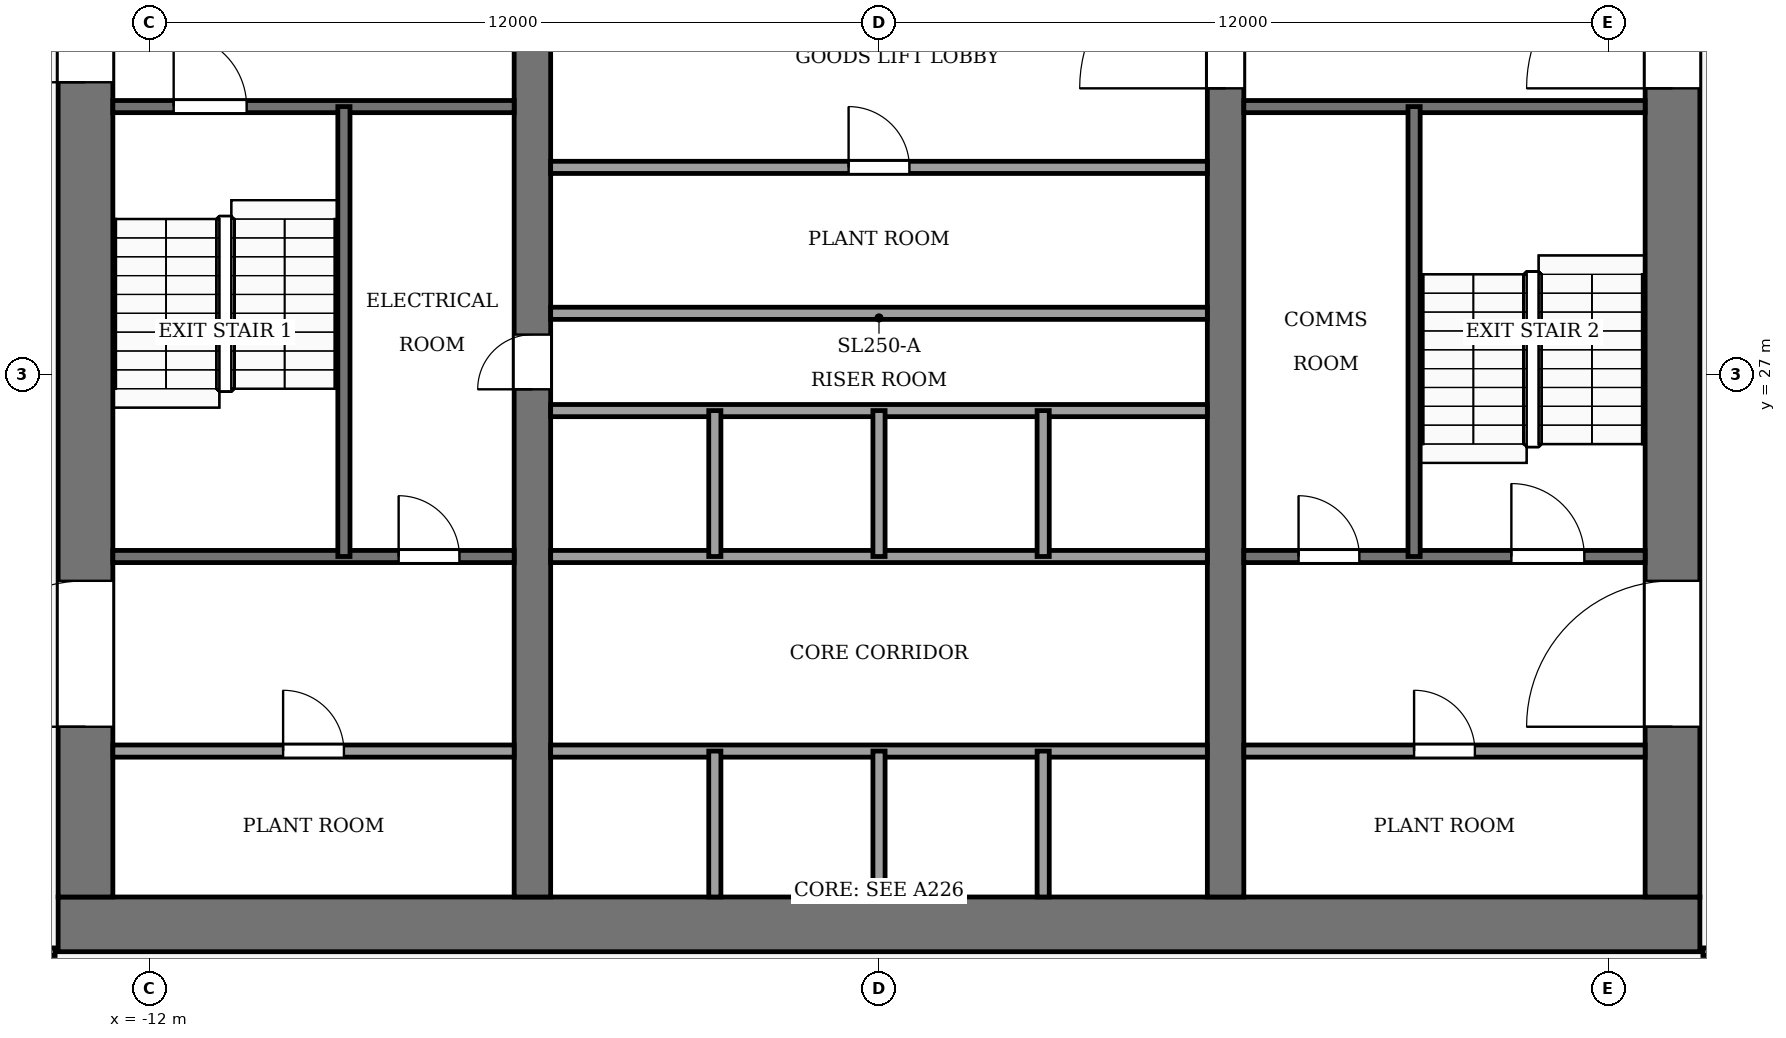
"""IFC4 building model, lengths in metres.
Left out: names, types, materials, properties, quantities, classifications, styles, units other than length and angle.
Written with IfcOpenShell. Run it as: python <this file> out.ifc"""

import sys

from ifc_helpers import new_model, si_unit, direction, frame, frame_2d, origin, place, context, subcontext, project, spatial, rectangle, extrude, element, fill, save


model = new_model("IFC4")
c1 = context("Model", 3, precision=1e-05, world=origin(), true_north=direction((0.0, 1.0)))
c2 = subcontext(c1, "Body", "Model", "MODEL_VIEW")
j1 = project(units=[si_unit("LENGTHUNIT", "METRE"), si_unit("PLANEANGLEUNIT", "RADIAN")], contexts=[c1])
p1 = place(None, origin())
s1 = spatial("IfcSite", under=j1, at=p1, CompositionType="ELEMENT")
p2 = place(p1, origin())
s2 = spatial("IfcBuilding", under=s1, at=p2, CompositionType="ELEMENT")
p3 = place(p2, frame((0.0, 0.0, 226.0)))
s3 = spatial("IfcBuildingStorey", under=s2, at=p3, CompositionType="ELEMENT", Elevation=226.0)
p4 = place(p3, frame((-13.5, 17.95, -0.25), z_axis=(0.0, 0.0, 1.0), x_axis=(1.0, 0.0, 0.0)))
e1 = element("IfcWall", 1, at=p4, inside=s3, PredefinedType="SHEAR", context=c2, shape_type="SweptSolid", body=[
    extrude(rectangle(XDim=27.0, YDim=0.9, at=frame_2d((13.5, 0.0))), origin(), (0.0, 0.0, 1.0), 7.12),
])
p5 = place(p3, frame((-13.05, 18.4, -0.25), z_axis=(0.0, 0.0, 1.0), x_axis=(0.0, 1.0, 0.0)))
e2 = element("IfcWall", 2, at=p5, inside=s3, PredefinedType="SHEAR", context=c2, shape_type="SweptSolid", body=[
    extrude(rectangle(XDim=19.2, YDim=0.9, at=frame_2d((9.6, 0.0))), origin(), (0.0, 0.0, 1.0), 7.12),
])
p6 = place(p5, frame((2.8, 0.0, 0.25)))
e3 = element("IfcOpeningElement", 3, at=p6, cuts=e2, PredefinedType="OPENING", context=c2, shape_type="SweptSolid", body=[
    extrude(rectangle(XDim=2.4, YDim=2.4, at=frame_2d((1.2, 1.2))), frame((0.0, 0.46, 0.0), z_axis=(0.0, -1.0, 0.0), x_axis=(1.0, 0.0, 0.0)), (0.0, 0.0, 1.0), 0.92),
])
p7 = place(p5, frame((13.4, 0.0, 0.25)))
e4 = element("IfcOpeningElement", 4, at=p7, cuts=e2, PredefinedType="OPENING", context=c2, shape_type="SweptSolid", body=[
    extrude(rectangle(XDim=1.4, YDim=2.2, at=frame_2d((0.7, 1.1))), frame((0.0, 0.46, 0.0), z_axis=(0.0, -1.0, 0.0), x_axis=(1.0, 0.0, 0.0)), (0.0, 0.0, 1.0), 0.92),
])
p8 = place(p3, frame((13.05, 18.4, -0.25), z_axis=(0.0, 0.0, 1.0), x_axis=(0.0, 1.0, 0.0)))
e5 = element("IfcWall", 5, at=p8, inside=s3, PredefinedType="SHEAR", context=c2, shape_type="SweptSolid", body=[
    extrude(rectangle(XDim=19.2, YDim=0.9, at=frame_2d((9.6, 0.0))), origin(), (0.0, 0.0, 1.0), 7.12),
])
p9 = place(p8, frame((2.8, 0.0, 0.25)))
e6 = element("IfcOpeningElement", 6, at=p9, cuts=e5, PredefinedType="OPENING", context=c2, shape_type="SweptSolid", body=[
    extrude(rectangle(XDim=2.4, YDim=2.4, at=frame_2d((1.2, 1.2))), frame((0.0, 0.46, 0.0), z_axis=(0.0, -1.0, 0.0), x_axis=(1.0, 0.0, 0.0)), (0.0, 0.0, 1.0), 0.92),
])
p10 = place(p8, frame((13.3, 0.0, 0.25)))
e7 = element("IfcOpeningElement", 7, at=p10, cuts=e5, PredefinedType="OPENING", context=c2, shape_type="SweptSolid", body=[
    extrude(rectangle(XDim=2.4, YDim=2.4, at=frame_2d((1.2, 1.2))), frame((0.0, 0.46, 0.0), z_axis=(0.0, -1.0, 0.0), x_axis=(1.0, 0.0, 0.0)), (0.0, 0.0, 1.0), 0.92),
])
p11 = place(p3, frame((-5.7, 18.4, -0.25), z_axis=(0.0, 0.0, 1.0), x_axis=(0.0, 1.0, 0.0)))
e8 = element("IfcWall", 8, at=p11, inside=s3, PredefinedType="SHEAR", context=c2, shape_type="SweptSolid", body=[
    extrude(rectangle(XDim=19.2, YDim=0.6, at=frame_2d((9.6, 0.0))), origin(), (0.0, 0.0, 1.0), 7.12),
])
p12 = place(p11, frame((8.35, 0.0, 0.25)))
e9 = element("IfcOpeningElement", 9, at=p12, cuts=e8, PredefinedType="OPENING", context=c2, shape_type="SweptSolid", body=[
    extrude(rectangle(XDim=0.9, YDim=2.1, at=frame_2d((0.45, 1.05))), frame((0.0, 0.31, 0.0), z_axis=(0.0, -1.0, 0.0), x_axis=(1.0, 0.0, 0.0)), (0.0, 0.0, 1.0), 0.62),
])
p13 = place(p3, frame((5.7, 18.4, -0.25), z_axis=(0.0, 0.0, 1.0), x_axis=(0.0, 1.0, 0.0)))
e10 = element("IfcWall", 10, at=p13, inside=s3, PredefinedType="SHEAR", context=c2, shape_type="SweptSolid", body=[
    extrude(rectangle(XDim=19.2, YDim=0.6, at=frame_2d((9.6, 0.0))), origin(), (0.0, 0.0, 1.0), 7.12),
])
p14 = place(p13, frame((13.3, 0.0, 0.25)))
e11 = element("IfcOpeningElement", 11, at=p14, cuts=e10, PredefinedType="OPENING", context=c2, shape_type="SweptSolid", body=[
    extrude(rectangle(XDim=2.4, YDim=2.4, at=frame_2d((1.2, 1.2))), frame((0.0, 0.31, 0.0), z_axis=(0.0, -1.0, 0.0), x_axis=(1.0, 0.0, 0.0)), (0.0, 0.0, 1.0), 0.62),
])
p15 = place(p3, frame((-12.6, 20.8, 0.0), z_axis=(0.0, 0.0, 1.0), x_axis=(1.0, 0.0, 0.0)))
e12 = element("IfcWall", 12, at=p15, inside=s3, PredefinedType="PARTITIONING", context=c2, shape_type="SweptSolid", body=[
    extrude(rectangle(XDim=6.6, YDim=0.2, at=frame_2d((3.3, 0.0))), origin(), (0.0, 0.0, 1.0), 6.87),
])
p16 = place(p15, frame((2.8, 0.0, 0.0)))
e13 = element("IfcOpeningElement", 13, at=p16, cuts=e12, PredefinedType="OPENING", context=c2, shape_type="SweptSolid", body=[
    extrude(rectangle(XDim=1.0, YDim=2.1, at=frame_2d((0.5, 1.05))), frame((0.0, 0.11, 0.0), z_axis=(0.0, -1.0, 0.0), x_axis=(1.0, 0.0, 0.0)), (0.0, 0.0, 1.0), 0.22),
])
p17 = place(p3, frame((-5.4, 20.8, 0.0), z_axis=(0.0, 0.0, 1.0), x_axis=(1.0, 0.0, 0.0)))
e14 = element("IfcWall", 14, at=p17, inside=s3, PredefinedType="PARTITIONING", context=c2, shape_type="SweptSolid", body=[
    extrude(rectangle(XDim=10.8, YDim=0.2, at=frame_2d((5.4, 0.0))), origin(), (0.0, 0.0, 1.0), 6.87),
])
p18 = place(p3, frame((6.0, 20.8, 0.0), z_axis=(0.0, 0.0, 1.0), x_axis=(1.0, 0.0, 0.0)))
e15 = element("IfcWall", 15, at=p18, inside=s3, PredefinedType="PARTITIONING", context=c2, shape_type="SweptSolid", body=[
    extrude(rectangle(XDim=6.6, YDim=0.2, at=frame_2d((3.3, 0.0))), origin(), (0.0, 0.0, 1.0), 6.87),
])
p19 = place(p18, frame((2.8, 0.0, 0.0)))
e16 = element("IfcOpeningElement", 16, at=p19, cuts=e15, PredefinedType="OPENING", context=c2, shape_type="SweptSolid", body=[
    extrude(rectangle(XDim=1.0, YDim=2.1, at=frame_2d((0.5, 1.05))), frame((0.0, 0.11, 0.0), z_axis=(0.0, -1.0, 0.0), x_axis=(1.0, 0.0, 0.0)), (0.0, 0.0, 1.0), 0.22),
])
p20 = place(p3, frame((-12.6, 24.0, 0.0), z_axis=(0.0, 0.0, 1.0), x_axis=(1.0, 0.0, 0.0)))
e17 = element("IfcWall", 17, at=p20, inside=s3, PredefinedType="PARTITIONING", context=c2, shape_type="SweptSolid", body=[
    extrude(rectangle(XDim=6.6, YDim=0.2, at=frame_2d((3.3, 0.0))), origin(), (0.0, 0.0, 1.0), 6.87),
])
p21 = place(p20, frame((4.7, 0.0, 0.0)))
e18 = element("IfcOpeningElement", 18, at=p21, cuts=e17, PredefinedType="OPENING", context=c2, shape_type="SweptSolid", body=[
    extrude(rectangle(XDim=1.0, YDim=2.1, at=frame_2d((0.5, 1.05))), frame((0.0, 0.11, 0.0), z_axis=(0.0, -1.0, 0.0), x_axis=(1.0, 0.0, 0.0)), (0.0, 0.0, 1.0), 0.22),
])
p22 = place(p3, frame((-5.4, 24.0, 0.0), z_axis=(0.0, 0.0, 1.0), x_axis=(1.0, 0.0, 0.0)))
e19 = element("IfcWall", 19, at=p22, inside=s3, PredefinedType="PARTITIONING", context=c2, shape_type="SweptSolid", body=[
    extrude(rectangle(XDim=10.8, YDim=0.2, at=frame_2d((5.4, 0.0))), origin(), (0.0, 0.0, 1.0), 6.87),
])
p23 = place(p3, frame((6.0, 24.0, 0.0), z_axis=(0.0, 0.0, 1.0), x_axis=(1.0, 0.0, 0.0)))
e20 = element("IfcWall", 20, at=p23, inside=s3, PredefinedType="PARTITIONING", context=c2, shape_type="SweptSolid", body=[
    extrude(rectangle(XDim=6.6, YDim=0.2, at=frame_2d((3.3, 0.0))), origin(), (0.0, 0.0, 1.0), 6.87),
])
p24 = place(p23, frame((0.9, 0.0, 0.0)))
e21 = element("IfcOpeningElement", 21, at=p24, cuts=e20, PredefinedType="OPENING", context=c2, shape_type="SweptSolid", body=[
    extrude(rectangle(XDim=1.0, YDim=2.1, at=frame_2d((0.5, 1.05))), frame((0.0, 0.11, 0.0), z_axis=(0.0, -1.0, 0.0), x_axis=(1.0, 0.0, 0.0)), (0.0, 0.0, 1.0), 0.22),
])
p25 = place(p23, frame((4.4, 0.0, 0.0)))
e22 = element("IfcOpeningElement", 22, at=p25, cuts=e20, PredefinedType="OPENING", context=c2, shape_type="SweptSolid", body=[
    extrude(rectangle(XDim=1.2, YDim=2.2, at=frame_2d((0.6, 1.1))), frame((0.0, 0.11, 0.0), z_axis=(0.0, -1.0, 0.0), x_axis=(1.0, 0.0, 0.0)), (0.0, 0.0, 1.0), 0.22),
])
for number, where, z_axis, x_axis in (
    (23, (-5.4, 26.4, 0.0), (0.0, 0.0, 1.0), (1.0, 0.0, 0.0)),
    (24, (-5.4, 28.0, 0.0), (0.0, 0.0, 1.0), (1.0, 0.0, 0.0)),
):
    element("IfcWall", number, at=place(p3, frame(where, z_axis=z_axis, x_axis=x_axis)), inside=s3, PredefinedType="PARTITIONING", context=c2, shape_type="SweptSolid", body=[
        extrude(rectangle(XDim=10.8, YDim=0.2, at=frame_2d((5.4, 0.0))), origin(), (0.0, 0.0, 1.0), 6.87),
    ])
p26 = place(p3, frame((-5.4, 30.4, 0.0), z_axis=(0.0, 0.0, 1.0), x_axis=(1.0, 0.0, 0.0)))
e25 = element("IfcWall", 25, at=p26, inside=s3, PredefinedType="PARTITIONING", context=c2, shape_type="SweptSolid", body=[
    extrude(rectangle(XDim=10.8, YDim=0.2, at=frame_2d((5.4, 0.0))), origin(), (0.0, 0.0, 1.0), 6.87),
])
p27 = place(p26, frame((4.9, 0.0, 0.0)))
e26 = element("IfcOpeningElement", 26, at=p27, cuts=e25, PredefinedType="OPENING", context=c2, shape_type="SweptSolid", body=[
    extrude(rectangle(XDim=1.0, YDim=2.1, at=frame_2d((0.5, 1.05))), frame((0.0, 0.11, 0.0), z_axis=(0.0, -1.0, 0.0), x_axis=(1.0, 0.0, 0.0)), (0.0, 0.0, 1.0), 0.22),
])
p28 = place(p3, frame((-12.6, 31.4, 0.0), z_axis=(0.0, 0.0, 1.0), x_axis=(1.0, 0.0, 0.0)))
e27 = element("IfcWall", 27, at=p28, inside=s3, PredefinedType="PARTITIONING", context=c2, shape_type="SweptSolid", body=[
    extrude(rectangle(XDim=6.6, YDim=0.2, at=frame_2d((3.3, 0.0))), origin(), (0.0, 0.0, 1.0), 6.87),
])
p29 = place(p28, frame((1.0, 0.0, 0.0)))
e28 = element("IfcOpeningElement", 28, at=p29, cuts=e27, PredefinedType="OPENING", context=c2, shape_type="SweptSolid", body=[
    extrude(rectangle(XDim=1.2, YDim=2.2, at=frame_2d((0.6, 1.1))), frame((0.0, 0.11, 0.0), z_axis=(0.0, -1.0, 0.0), x_axis=(1.0, 0.0, 0.0)), (0.0, 0.0, 1.0), 0.22),
])
p30 = place(p3, frame((6.0, 31.4, 0.0), z_axis=(0.0, 0.0, 1.0), x_axis=(1.0, 0.0, 0.0)))
e29 = element("IfcWall", 29, at=p30, inside=s3, PredefinedType="PARTITIONING", context=c2, shape_type="SweptSolid", body=[
    extrude(rectangle(XDim=6.6, YDim=0.2, at=frame_2d((3.3, 0.0))), origin(), (0.0, 0.0, 1.0), 6.87),
])
p31 = place(p3, frame((-8.8, 24.0, 0.0), z_axis=(0.0, 0.0, 1.0), x_axis=(0.0, 1.0, 0.0)))
e30 = element("IfcWall", 30, at=p31, inside=s3, PredefinedType="PARTITIONING", context=c2, shape_type="SweptSolid", body=[
    extrude(rectangle(XDim=7.4, YDim=0.2, at=frame_2d((3.7, 0.0))), origin(), (0.0, 0.0, 1.0), 6.87),
])
p32 = place(p3, frame((-2.7, 18.4, 0.0), z_axis=(0.0, 0.0, 1.0), x_axis=(0.0, 1.0, 0.0)))
e31 = element("IfcWall", 31, at=p32, inside=s3, PredefinedType="PARTITIONING", context=c2, shape_type="SweptSolid", body=[
    extrude(rectangle(XDim=2.4, YDim=0.2, at=frame_2d((1.2, 0.0))), origin(), (0.0, 0.0, 1.0), 6.87),
])
p33 = place(p3, frame((-2.7, 24.0, 0.0), z_axis=(0.0, 0.0, 1.0), x_axis=(0.0, 1.0, 0.0)))
e32 = element("IfcWall", 32, at=p33, inside=s3, PredefinedType="PARTITIONING", context=c2, shape_type="SweptSolid", body=[
    extrude(rectangle(XDim=2.4, YDim=0.2, at=frame_2d((1.2, 0.0))), origin(), (0.0, 0.0, 1.0), 6.87),
])
p34 = place(p3, frame((0.0, 18.4, 0.0), z_axis=(0.0, 0.0, 1.0), x_axis=(0.0, 1.0, 0.0)))
e33 = element("IfcWall", 33, at=p34, inside=s3, PredefinedType="PARTITIONING", context=c2, shape_type="SweptSolid", body=[
    extrude(rectangle(XDim=2.4, YDim=0.2, at=frame_2d((1.2, 0.0))), origin(), (0.0, 0.0, 1.0), 6.87),
])
p35 = place(p3, frame((0.0, 24.0, 0.0), z_axis=(0.0, 0.0, 1.0), x_axis=(0.0, 1.0, 0.0)))
e34 = element("IfcWall", 34, at=p35, inside=s3, PredefinedType="PARTITIONING", context=c2, shape_type="SweptSolid", body=[
    extrude(rectangle(XDim=2.4, YDim=0.2, at=frame_2d((1.2, 0.0))), origin(), (0.0, 0.0, 1.0), 6.87),
])
p36 = place(p3, frame((2.7, 18.4, 0.0), z_axis=(0.0, 0.0, 1.0), x_axis=(0.0, 1.0, 0.0)))
e35 = element("IfcWall", 35, at=p36, inside=s3, PredefinedType="PARTITIONING", context=c2, shape_type="SweptSolid", body=[
    extrude(rectangle(XDim=2.4, YDim=0.2, at=frame_2d((1.2, 0.0))), origin(), (0.0, 0.0, 1.0), 6.87),
])
p37 = place(p3, frame((2.7, 24.0, 0.0), z_axis=(0.0, 0.0, 1.0), x_axis=(0.0, 1.0, 0.0)))
e36 = element("IfcWall", 36, at=p37, inside=s3, PredefinedType="PARTITIONING", context=c2, shape_type="SweptSolid", body=[
    extrude(rectangle(XDim=2.4, YDim=0.2, at=frame_2d((1.2, 0.0))), origin(), (0.0, 0.0, 1.0), 6.87),
])
p38 = place(p3, frame((8.8, 24.0, 0.0), z_axis=(0.0, 0.0, 1.0), x_axis=(0.0, 1.0, 0.0)))
e37 = element("IfcWall", 37, at=p38, inside=s3, PredefinedType="PARTITIONING", context=c2, shape_type="SweptSolid", body=[
    extrude(rectangle(XDim=7.4, YDim=0.2, at=frame_2d((3.7, 0.0))), origin(), (0.0, 0.0, 1.0), 6.87),
])
for number, where, z_axis, x_axis in (
    (38, (15.698, 17.5, 0.0), (0.0, 0.0, 1.0), (-1.0, 0.0, 0.0)),
    (39, (-13.55, 17.5, 0.0), (0.0, 0.0, 1.0), (-1.0, 0.0, 0.0)),
):
    element("IfcWall", number, at=place(p3, frame(where, z_axis=z_axis, x_axis=x_axis)), inside=s3, PredefinedType="PARTITIONING", context=c2, shape_type="SweptSolid", body=[
        extrude(rectangle(XDim=2.148, YDim=0.125, at=frame_2d((1.074, 0.0))), origin(), (0.0, 0.0, 1.0), 6.14),
    ])
p39 = place(p27, origin())
e40 = element("IfcDoor", 40, at=p39, inside=s3, OperationType="SINGLE_SWING_RIGHT", PredefinedType="DOOR", context=c2, shape_type="SweptSolid", body=[
    extrude(rectangle(XDim=1.0, YDim=2.1, at=frame_2d((0.5, 1.05))), frame((0.0, 0.025, 0.0), z_axis=(0.0, -1.0, 0.0), x_axis=(1.0, 0.0, 0.0)), (0.0, 0.0, 1.0), 0.05),
])
fill(e26, e40)
p40 = place(p16, origin())
e41 = element("IfcDoor", 41, at=p40, inside=s3, OperationType="SINGLE_SWING_RIGHT", PredefinedType="DOOR", context=c2, shape_type="SweptSolid", body=[
    extrude(rectangle(XDim=1.0, YDim=2.1, at=frame_2d((0.5, 1.05))), frame((0.0, 0.025, 0.0), z_axis=(0.0, -1.0, 0.0), x_axis=(1.0, 0.0, 0.0)), (0.0, 0.0, 1.0), 0.05),
])
fill(e13, e41)
p41 = place(p19, origin())
e42 = element("IfcDoor", 42, at=p41, inside=s3, OperationType="SINGLE_SWING_LEFT", PredefinedType="DOOR", context=c2, shape_type="SweptSolid", body=[
    extrude(rectangle(XDim=1.0, YDim=2.1, at=frame_2d((0.5, 1.05))), frame((0.0, 0.025, 0.0), z_axis=(0.0, -1.0, 0.0), x_axis=(1.0, 0.0, 0.0)), (0.0, 0.0, 1.0), 0.05),
])
fill(e16, e42)
p42 = place(p21, origin())
e43 = element("IfcDoor", 43, at=p42, inside=s3, OperationType="SINGLE_SWING_LEFT", PredefinedType="DOOR", context=c2, shape_type="SweptSolid", body=[
    extrude(rectangle(XDim=1.0, YDim=2.1, at=frame_2d((0.5, 1.05))), frame((0.0, 0.025, 0.0), z_axis=(0.0, -1.0, 0.0), x_axis=(1.0, 0.0, 0.0)), (0.0, 0.0, 1.0), 0.05),
])
fill(e18, e43)
p43 = place(p24, origin())
e44 = element("IfcDoor", 44, at=p43, inside=s3, OperationType="SINGLE_SWING_RIGHT", PredefinedType="DOOR", context=c2, shape_type="SweptSolid", body=[
    extrude(rectangle(XDim=1.0, YDim=2.1, at=frame_2d((0.5, 1.05))), frame((0.0, 0.025, 0.0), z_axis=(0.0, -1.0, 0.0), x_axis=(1.0, 0.0, 0.0)), (0.0, 0.0, 1.0), 0.05),
])
fill(e21, e44)
p44 = place(p12, origin())
e45 = element("IfcDoor", 45, at=p44, inside=s3, OperationType="SINGLE_SWING_LEFT", PredefinedType="DOOR", context=c2, shape_type="SweptSolid", body=[
    extrude(rectangle(XDim=0.9, YDim=2.1, at=frame_2d((0.45, 1.05))), frame((0.0, 0.025, 0.0), z_axis=(0.0, -1.0, 0.0), x_axis=(1.0, 0.0, 0.0)), (0.0, 0.0, 1.0), 0.05),
])
fill(e9, e45)
p45 = place(p29, origin())
e46 = element("IfcDoor", 46, at=p45, inside=s3, OperationType="SINGLE_SWING_LEFT", PredefinedType="DOOR", context=c2, shape_type="SweptSolid", body=[
    extrude(rectangle(XDim=1.2, YDim=2.2, at=frame_2d((0.6, 1.1))), frame((0.0, 0.025, 0.0), z_axis=(0.0, -1.0, 0.0), x_axis=(1.0, 0.0, 0.0)), (0.0, 0.0, 1.0), 0.05),
])
fill(e28, e46)
p46 = place(p25, origin())
e47 = element("IfcDoor", 47, at=p46, inside=s3, OperationType="SINGLE_SWING_RIGHT", PredefinedType="DOOR", context=c2, shape_type="SweptSolid", body=[
    extrude(rectangle(XDim=1.2, YDim=2.2, at=frame_2d((0.6, 1.1))), frame((0.0, 0.025, 0.0), z_axis=(0.0, -1.0, 0.0), x_axis=(1.0, 0.0, 0.0)), (0.0, 0.0, 1.0), 0.05),
])
fill(e22, e47)
p47 = place(p14, origin())
e48 = element("IfcDoor", 48, at=p47, inside=s3, OperationType="DOUBLE_DOOR_SINGLE_SWING", PredefinedType="DOOR", context=c2, shape_type="SweptSolid", body=[
    extrude(rectangle(XDim=2.4, YDim=2.4, at=frame_2d((1.2, 1.2))), frame((0.0, 0.025, 0.0), z_axis=(0.0, -1.0, 0.0), x_axis=(1.0, 0.0, 0.0)), (0.0, 0.0, 1.0), 0.05),
])
fill(e11, e48)
p48 = place(p6, origin())
e49 = element("IfcDoor", 49, at=p48, inside=s3, OperationType="DOUBLE_DOOR_SINGLE_SWING", PredefinedType="DOOR", context=c2, shape_type="SweptSolid", body=[
    extrude(rectangle(XDim=2.4, YDim=2.4, at=frame_2d((1.2, 1.2))), frame((0.0, 0.025, 0.0), z_axis=(0.0, -1.0, 0.0), x_axis=(1.0, 0.0, 0.0)), (0.0, 0.0, 1.0), 0.05),
])
fill(e3, e49)
p49 = place(p9, origin())
e50 = element("IfcDoor", 50, at=p49, inside=s3, OperationType="DOUBLE_DOOR_SINGLE_SWING", PredefinedType="DOOR", context=c2, shape_type="SweptSolid", body=[
    extrude(rectangle(XDim=2.4, YDim=2.4, at=frame_2d((1.2, 1.2))), frame((0.0, 0.025, 0.0), z_axis=(0.0, -1.0, 0.0), x_axis=(1.0, 0.0, 0.0)), (0.0, 0.0, 1.0), 0.05),
])
fill(e6, e50)
p50 = place(p10, origin())
e51 = element("IfcDoor", 51, at=p50, inside=s3, OperationType="DOUBLE_DOOR_SINGLE_SWING", PredefinedType="DOOR", context=c2, shape_type="SweptSolid", body=[
    extrude(rectangle(XDim=2.4, YDim=2.4, at=frame_2d((1.2, 1.2))), frame((0.0, 0.025, 0.0), z_axis=(0.0, -1.0, 0.0), x_axis=(1.0, 0.0, 0.0)), (0.0, 0.0, 1.0), 0.05),
])
fill(e7, e51)
p51 = place(p7, origin())
e52 = element("IfcDoor", 52, at=p51, inside=s3, OperationType="SINGLE_SWING_LEFT", PredefinedType="DOOR", context=c2, shape_type="SweptSolid", body=[
    extrude(rectangle(XDim=1.4, YDim=2.2, at=frame_2d((0.7, 1.1))), frame((0.0, 0.025, 0.0), z_axis=(0.0, -1.0, 0.0), x_axis=(1.0, 0.0, 0.0)), (0.0, 0.0, 1.0), 0.05),
])
fill(e4, e52)
save(model, sys.argv[1])
